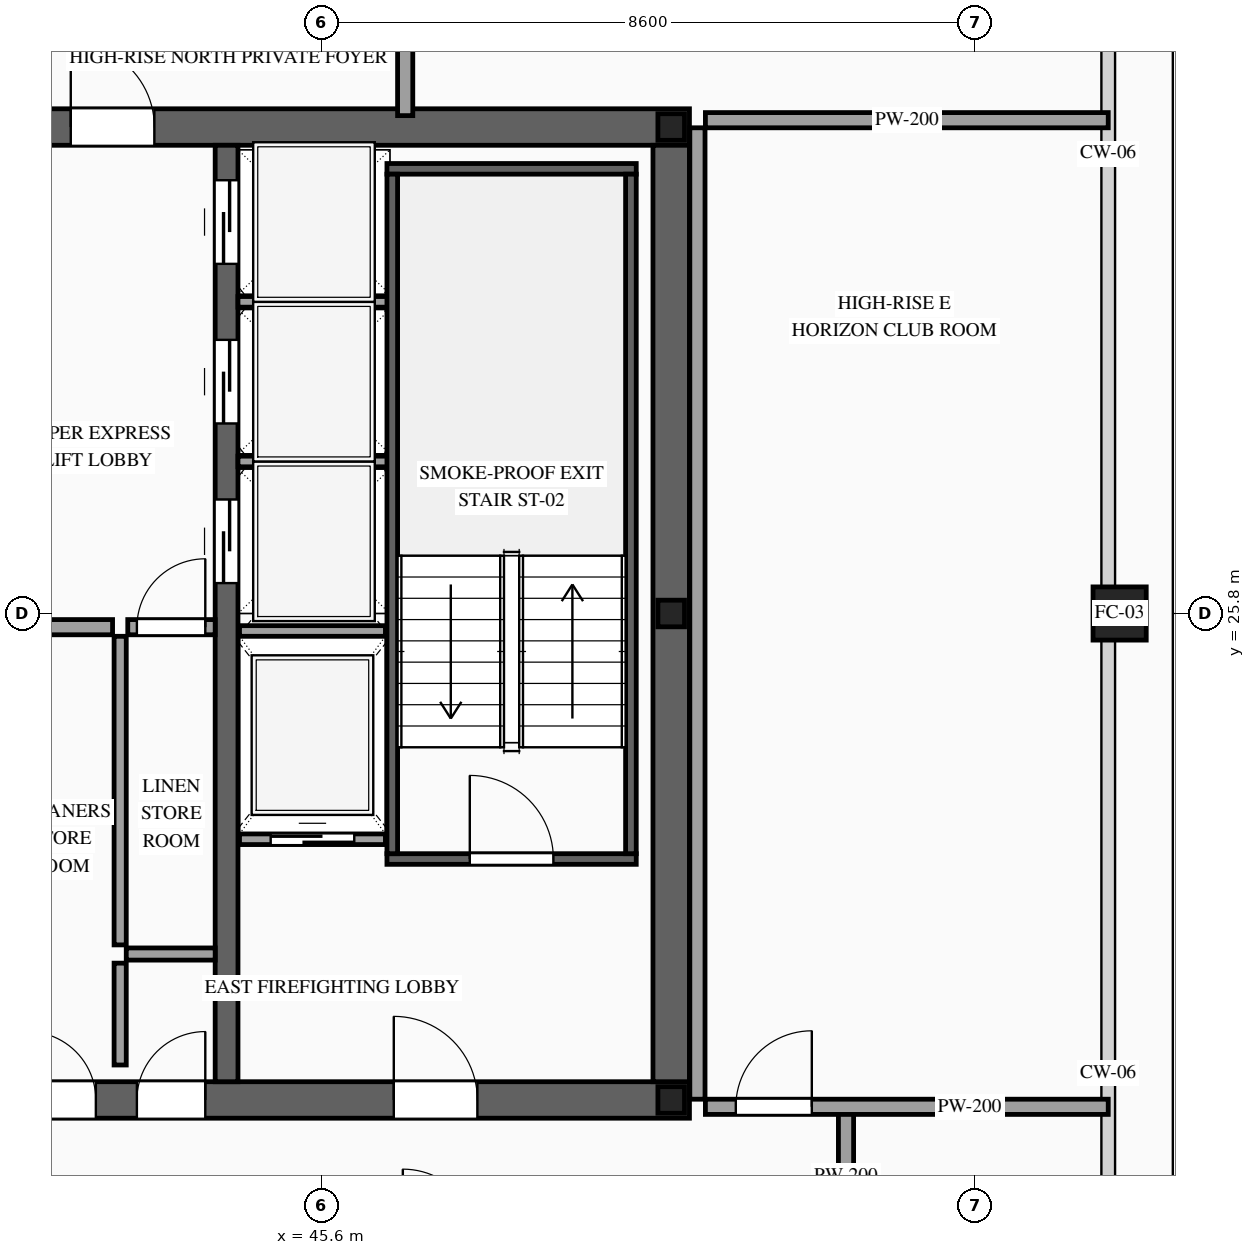
"""IFC4 building model, lengths in metres.
Left out: names, types, materials, properties, quantities, classifications, styles, units other than length and angle.
Written with IfcOpenShell. Run it as: python <this file> out.ifc"""

import sys

from ifc_helpers import new_model, si_unit, direction, frame, frame_2d, origin, origin_2d, place, context, subcontext, project, spatial, rectangle, hollow_rectangle, i_section, extrude, source, transform, mapped, element, fill, save


model = new_model("IFC4")
c1 = context("Model", 3, precision=1e-05, world=origin(), true_north=direction((0.0, 1.0)))
c2 = subcontext(c1, "Body", "Model", "MODEL_VIEW")
j1 = project(units=[si_unit("LENGTHUNIT", "METRE"), si_unit("PLANEANGLEUNIT", "RADIAN")], contexts=[c1])
p1 = place(None, origin())
s1 = spatial("IfcSite", under=j1, at=p1, CompositionType="ELEMENT")
p2 = place(p1, origin())
s2 = spatial("IfcBuilding", under=s1, at=p2, CompositionType="ELEMENT")
p3 = place(p2, frame((0.0, 0.0, 289.1)))
s3 = spatial("IfcBuildingStorey", under=s2, at=p3, CompositionType="ELEMENT", Elevation=289.1)
p4 = place(p3, frame((23.56, 19.4, 0.0), z_axis=(0.0, 0.0, 1.0), x_axis=(1.0, 0.0, 0.0)))
e1 = element("IfcWall", 1, at=p4, inside=s3, PredefinedType="SHEAR", context=c2, shape_type="SweptSolid", body=[
    extrude(rectangle(XDim=26.88, YDim=0.48, at=frame_2d((13.44, 0.0))), origin(), (0.0, 0.0, 1.0), 3.5),
])
p5 = place(p4, frame((1.89, 0.0, 0.0)))
e2 = element("IfcOpeningElement", 2, at=p5, cuts=e1, PredefinedType="OPENING", context=c2, shape_type="SweptSolid", body=[
    extrude(rectangle(XDim=1.1, YDim=2.2, at=frame_2d((0.55, 1.1))), frame((0.0, 0.255, 0.0), z_axis=(0.0, -1.0, 0.0), x_axis=(1.0, 0.0, 0.0)), (0.0, 0.0, 1.0), 0.51),
])
p6 = place(p4, frame((9.79, 0.0, 0.0)))
e3 = element("IfcOpeningElement", 3, at=p6, cuts=e1, PredefinedType="OPENING", context=c2, shape_type="SweptSolid", body=[
    extrude(rectangle(XDim=1.1, YDim=2.2, at=frame_2d((0.55, 1.1))), frame((0.0, 0.255, 0.0), z_axis=(0.0, -1.0, 0.0), x_axis=(1.0, 0.0, 0.0)), (0.0, 0.0, 1.0), 0.51),
])
p7 = place(p4, frame((22.99, 0.0, 0.0)))
e4 = element("IfcOpeningElement", 4, at=p7, cuts=e1, PredefinedType="OPENING", context=c2, shape_type="SweptSolid", body=[
    extrude(rectangle(XDim=1.1, YDim=2.2, at=frame_2d((0.55, 1.1))), frame((0.0, 0.255, 0.0), z_axis=(0.0, -1.0, 0.0), x_axis=(1.0, 0.0, 0.0)), (0.0, 0.0, 1.0), 0.51),
])
p8 = place(p4, frame((19.61, 0.0, 0.0)))
e5 = element("IfcOpeningElement", 5, at=p8, cuts=e1, PredefinedType="OPENING", context=c2, shape_type="SweptSolid", body=[
    extrude(rectangle(XDim=0.9, YDim=2.15, at=frame_2d((0.45, 1.075))), frame((0.0, 0.255, 0.0), z_axis=(0.0, -1.0, 0.0), x_axis=(1.0, 0.0, 0.0)), (0.0, 0.0, 1.0), 0.51),
])
p9 = place(p4, frame((18.17, 0.0, 0.0)))
e6 = element("IfcOpeningElement", 6, at=p9, cuts=e1, PredefinedType="OPENING", context=c2, shape_type="SweptSolid", body=[
    extrude(rectangle(XDim=0.9, YDim=2.15, at=frame_2d((0.45, 1.075))), frame((0.0, 0.255, 0.0), z_axis=(0.0, -1.0, 0.0), x_axis=(1.0, 0.0, 0.0)), (0.0, 0.0, 1.0), 0.51),
])
p10 = place(p3, frame((23.56, 32.2, 0.0), z_axis=(0.0, 0.0, 1.0), x_axis=(1.0, 0.0, 0.0)))
e7 = element("IfcWall", 7, at=p10, inside=s3, PredefinedType="SHEAR", context=c2, shape_type="SweptSolid", body=[
    extrude(rectangle(XDim=26.88, YDim=0.48, at=frame_2d((13.44, 0.0))), origin(), (0.0, 0.0, 1.0), 3.5),
])
p11 = place(p10, frame((4.51, 0.0, 0.0)))
e8 = element("IfcOpeningElement", 8, at=p11, cuts=e7, PredefinedType="OPENING", context=c2, shape_type="SweptSolid", body=[
    extrude(rectangle(XDim=0.9, YDim=2.15, at=frame_2d((0.45, 1.075))), frame((0.0, 0.255, 0.0), z_axis=(0.0, -1.0, 0.0), x_axis=(1.0, 0.0, 0.0)), (0.0, 0.0, 1.0), 0.51),
])
p12 = place(p10, frame((9.79, 0.0, 0.0)))
e9 = element("IfcOpeningElement", 9, at=p12, cuts=e7, PredefinedType="OPENING", context=c2, shape_type="SweptSolid", body=[
    extrude(rectangle(XDim=1.1, YDim=2.2, at=frame_2d((0.55, 1.1))), frame((0.0, 0.255, 0.0), z_axis=(0.0, -1.0, 0.0), x_axis=(1.0, 0.0, 0.0)), (0.0, 0.0, 1.0), 0.51),
])
p13 = place(p10, frame((15.64, 0.0, 0.0)))
e10 = element("IfcOpeningElement", 10, at=p13, cuts=e7, PredefinedType="OPENING", context=c2, shape_type="SweptSolid", body=[
    extrude(rectangle(XDim=1.1, YDim=2.2, at=frame_2d((0.55, 1.1))), frame((0.0, 0.255, 0.0), z_axis=(0.0, -1.0, 0.0), x_axis=(1.0, 0.0, 0.0)), (0.0, 0.0, 1.0), 0.51),
])
p14 = place(p10, frame((18.74, 0.0, 0.0)))
e11 = element("IfcOpeningElement", 11, at=p14, cuts=e7, PredefinedType="OPENING", context=c2, shape_type="SweptSolid", body=[
    extrude(rectangle(XDim=1.1, YDim=2.2, at=frame_2d((0.55, 1.1))), frame((0.0, 0.255, 0.0), z_axis=(0.0, -1.0, 0.0), x_axis=(1.0, 0.0, 0.0)), (0.0, 0.0, 1.0), 0.51),
])
m1 = source(origin(), c2, "Body", "SweptSolid", [
    extrude(rectangle(XDim=12.32, YDim=0.48, at=frame_2d((6.16, 0.0))), origin(), (0.0, 0.0, 1.0), 3.5),
])
p15 = place(p3, frame((50.2, 19.64, 0.0), z_axis=(0.0, 0.0, 1.0), x_axis=(0.0, 1.0, 0.0)))
e12 = element("IfcWall", 12, at=p15, inside=s3, PredefinedType="SHEAR", context=c2, shape_type="MappedRepresentation", body=[
    mapped(m1, transform((0.0, 0.0, 0.0), scale=1.0)),
])
p16 = place(p3, frame((44.35, 19.64, 0.0), z_axis=(0.0, 0.0, 1.0), x_axis=(0.0, 1.0, 0.0)))
e13 = element("IfcWall", 13, at=p16, inside=s3, PredefinedType="SOLIDWALL", context=c2, shape_type="SweptSolid", body=[
    extrude(rectangle(XDim=12.32, YDim=0.3, at=frame_2d((6.16, 0.0))), origin(), (0.0, 0.0, 1.0), 3.5),
])
p17 = place(p16, frame((6.56, 0.0, 0.0)))
e14 = element("IfcOpeningElement", 14, at=p17, cuts=e13, PredefinedType="OPENING", context=c2, shape_type="SweptSolid", body=[
    extrude(rectangle(XDim=1.1, YDim=2.2, at=frame_2d((0.55, 1.1))), frame((0.0, 0.165, 0.0), z_axis=(0.0, -1.0, 0.0), x_axis=(1.0, 0.0, 0.0)), (0.0, 0.0, 1.0), 0.33),
])
p18 = place(p16, frame((8.66, 0.0, 0.0)))
e15 = element("IfcOpeningElement", 15, at=p18, cuts=e13, PredefinedType="OPENING", context=c2, shape_type="SweptSolid", body=[
    extrude(rectangle(XDim=1.1, YDim=2.2, at=frame_2d((0.55, 1.1))), frame((0.0, 0.165, 0.0), z_axis=(0.0, -1.0, 0.0), x_axis=(1.0, 0.0, 0.0)), (0.0, 0.0, 1.0), 0.33),
])
p19 = place(p16, frame((10.76, 0.0, 0.0)))
e16 = element("IfcOpeningElement", 16, at=p19, cuts=e13, PredefinedType="OPENING", context=c2, shape_type="SweptSolid", body=[
    extrude(rectangle(XDim=1.1, YDim=2.2, at=frame_2d((0.55, 1.1))), frame((0.0, 0.165, 0.0), z_axis=(0.0, -1.0, 0.0), x_axis=(1.0, 0.0, 0.0)), (0.0, 0.0, 1.0), 0.33),
])
m2 = source(origin(), c2, "Body", "SweptSolid", [
    extrude(i_section(OverallWidth=0.35, OverallDepth=0.35, WebThickness=0.012, FlangeThickness=0.019, at=origin_2d()), origin(), (0.0, 0.0, 1.0), 3.5),
])
for number, where, z_axis, x_axis in (
    (17, (50.2, 19.4, 0.0), (0.0, 0.0, 1.0), (1.0, 0.0, 0.0)),
    (18, (50.2, 25.8, 0.0), (0.0, 0.0, 1.0), (1.0, 0.0, 0.0)),
    (19, (50.2, 32.2, 0.0), (0.0, 0.0, 1.0), (1.0, 0.0, 0.0)),
):
    element("IfcColumn", number, at=place(p3, frame(where, z_axis=z_axis, x_axis=x_axis)), inside=s3, PredefinedType="COLUMN", context=c2, shape_type="MappedRepresentation", body=[
        mapped(m2, transform((0.0, 0.0, 0.0), scale=1.0)),
    ])
m3 = source(origin(), c2, "Body", "SweptSolid", [
    extrude(hollow_rectangle(XDim=0.7, YDim=0.7, WallThickness=0.032, at=origin_2d()), origin(), (0.0, 0.0, 1.0), 3.5),
])
p20 = place(p3, frame((56.1, 25.8, 0.0), z_axis=(0.0, 0.0, 1.0), x_axis=(1.0, 0.0, 0.0)))
e20 = element("IfcColumn", 20, at=p20, inside=s3, PredefinedType="COLUMN", context=c2, shape_type="MappedRepresentation", body=[
    mapped(m3, transform((0.0, 0.0, 0.0), scale=1.0)),
])
p21 = place(p3, frame((44.52, 22.83, 0.0), z_axis=(0.0, 0.0, 1.0), x_axis=(1.0, 0.0, 0.0)))
e21 = element("IfcWall", 21, at=p21, inside=s3, PredefinedType="SOLIDWALL", context=c2, shape_type="SweptSolid", body=[
    extrude(rectangle(XDim=1.92, YDim=0.14, at=frame_2d((0.96, 0.0))), origin(), (0.0, 0.0, 1.0), 3.28),
])
p22 = place(p21, frame((0.41, 0.0, 0.0)))
e22 = element("IfcOpeningElement", 22, at=p22, cuts=e21, PredefinedType="OPENING", context=c2, shape_type="SweptSolid", body=[
    extrude(rectangle(XDim=1.1, YDim=2.2, at=frame_2d((0.55, 1.1))), frame((0.0, 0.085, 0.0), z_axis=(0.0, -1.0, 0.0), x_axis=(1.0, 0.0, 0.0)), (0.0, 0.0, 1.0), 0.17),
])
m4 = source(origin(), c2, "Body", "SweptSolid", [
    extrude(rectangle(XDim=1.92, YDim=0.14, at=frame_2d((0.96, 0.0))), origin(), (0.0, 0.0, 1.0), 3.28),
])
p23 = place(p3, frame((44.52, 25.57, 0.0), z_axis=(0.0, 0.0, 1.0), x_axis=(1.0, 0.0, 0.0)))
e23 = element("IfcWall", 23, at=p23, inside=s3, PredefinedType="SOLIDWALL", context=c2, shape_type="MappedRepresentation", body=[
    mapped(m4, transform((0.0, 0.0, 0.0), scale=1.0)),
])
m5 = source(origin(), c2, "Body", "SweptSolid", [
    extrude(rectangle(XDim=2.0, YDim=0.14, at=frame_2d((1.0, 0.0))), origin(), (0.0, 0.0, 1.0), 3.28),
])
for number, where, z_axis, x_axis in (
    (24, (44.5, 27.8, 0.0), (0.0, 0.0, 1.0), (1.0, 0.0, 0.0)),
    (25, (44.5, 29.9, 0.0), (0.0, 0.0, 1.0), (1.0, 0.0, 0.0)),
):
    element("IfcWall", number, at=place(p3, frame(where, z_axis=z_axis, x_axis=x_axis)), inside=s3, PredefinedType="SOLIDWALL", context=c2, shape_type="MappedRepresentation", body=[
        mapped(m5, transform((0.0, 0.0, 0.0), scale=1.0)),
    ])
p24 = place(p3, frame((46.46, 22.57, 0.0), z_axis=(0.0, 0.0, 1.0), x_axis=(1.0, 0.0, 0.0)))
e26 = element("IfcWall", 26, at=p24, inside=s3, PredefinedType="SOLIDWALL", context=c2, shape_type="SweptSolid", body=[
    extrude(rectangle(XDim=3.28, YDim=0.14, at=frame_2d((1.64, 0.0))), origin(), (0.0, 0.0, 1.0), 3.28),
])
p25 = place(p24, frame((1.09, 0.0, 0.0)))
e27 = element("IfcOpeningElement", 27, at=p25, cuts=e26, PredefinedType="OPENING", context=c2, shape_type="SweptSolid", body=[
    extrude(rectangle(XDim=1.1, YDim=2.2, at=frame_2d((0.55, 1.1))), frame((0.0, 0.085, 0.0), z_axis=(0.0, -1.0, 0.0), x_axis=(1.0, 0.0, 0.0)), (0.0, 0.0, 1.0), 0.17),
])
m6 = source(origin(), c2, "Body", "SweptSolid", [
    extrude(rectangle(XDim=3.28, YDim=0.14, at=frame_2d((1.64, 0.0))), origin(), (0.0, 0.0, 1.0), 3.28),
])
p26 = place(p3, frame((46.46, 31.65, 0.0), z_axis=(0.0, 0.0, 1.0), x_axis=(1.0, 0.0, 0.0)))
e28 = element("IfcWall", 28, at=p26, inside=s3, PredefinedType="SOLIDWALL", context=c2, shape_type="MappedRepresentation", body=[
    mapped(m6, transform((0.0, 0.0, 0.0), scale=1.0)),
])
m7 = source(origin(), c2, "Body", "SweptSolid", [
    extrude(rectangle(XDim=8.94, YDim=0.14, at=frame_2d((4.47, 0.0))), origin(), (0.0, 0.0, 1.0), 3.28),
])
for number, where, z_axis, x_axis in (
    (29, (46.53, 22.64, 0.0), (0.0, 0.0, 1.0), (0.0, 1.0, 0.0)),
    (30, (49.67, 22.64, 0.0), (0.0, 0.0, 1.0), (0.0, 1.0, 0.0)),
):
    element("IfcWall", number, at=place(p3, frame(where, z_axis=z_axis, x_axis=x_axis)), inside=s3, PredefinedType="SOLIDWALL", context=c2, shape_type="MappedRepresentation", body=[
        mapped(m7, transform((0.0, 0.0, 0.0), scale=1.0)),
    ])
m8 = source(origin(), c2, "Body", "SweptSolid", [
    extrude(rectangle(XDim=1.34, YDim=0.16, at=frame_2d((0.67, 0.0))), origin(), (0.0, 0.0, 1.0), 3.28),
])
p27 = place(p3, frame((42.95, 19.86, 0.0), z_axis=(0.0, 0.0, 1.0), x_axis=(0.0, 1.0, 0.0)))
e31 = element("IfcWall", 31, at=p27, inside=s3, PredefinedType="PARTITIONING", context=c2, shape_type="MappedRepresentation", body=[
    mapped(m8, transform((0.0, 0.0, 0.0), scale=1.0)),
])
m9 = source(origin(), c2, "Body", "SweptSolid", [
    extrude(rectangle(XDim=1.17, YDim=0.16, at=frame_2d((0.585, 0.0))), origin(), (0.0, 0.0, 1.0), 3.28),
])
p28 = place(p3, frame((43.03, 21.32, 0.0), z_axis=(0.0, 0.0, 1.0), x_axis=(1.0, 0.0, 0.0)))
e32 = element("IfcWall", 32, at=p28, inside=s3, PredefinedType="PARTITIONING", context=c2, shape_type="MappedRepresentation", body=[
    mapped(m9, transform((0.0, 0.0, 0.0), scale=1.0)),
])
m10 = source(origin(), c2, "Body", "SweptSolid", [
    extrude(rectangle(XDim=1.35, YDim=0.2, at=frame_2d((0.675, 0.0))), origin(), (0.0, 0.0, 1.0), 3.28),
])
p29 = place(p3, frame((41.5, 25.62, 0.0), z_axis=(0.0, 0.0, 1.0), x_axis=(1.0, 0.0, 0.0)))
e33 = element("IfcWall", 33, at=p29, inside=s3, PredefinedType="PARTITIONING", context=c2, shape_type="MappedRepresentation", body=[
    mapped(m10, transform((0.0, 0.0, 0.0), scale=1.0)),
])
m11 = source(origin(), c2, "Body", "SweptSolid", [
    extrude(rectangle(XDim=4.06, YDim=0.16, at=frame_2d((2.03, 0.0))), origin(), (0.0, 0.0, 1.0), 3.28),
])
p30 = place(p3, frame((42.95, 21.44, 0.0), z_axis=(0.0, 0.0, 1.0), x_axis=(0.0, 1.0, 0.0)))
e34 = element("IfcWall", 34, at=p30, inside=s3, PredefinedType="PARTITIONING", context=c2, shape_type="MappedRepresentation", body=[
    mapped(m11, transform((0.0, 0.0, 0.0), scale=1.0)),
])
p31 = place(p3, frame((43.05, 25.62, 0.0), z_axis=(0.0, 0.0, 1.0), x_axis=(1.0, 0.0, 0.0)))
e35 = element("IfcWall", 35, at=p31, inside=s3, PredefinedType="PARTITIONING", context=c2, shape_type="SweptSolid", body=[
    extrude(rectangle(XDim=1.15, YDim=0.2, at=frame_2d((0.575, 0.0))), origin(), (0.0, 0.0, 1.0), 3.28),
])
p32 = place(p31, frame((0.12, 0.0, 0.0)))
e36 = element("IfcOpeningElement", 36, at=p32, cuts=e35, PredefinedType="OPENING", context=c2, shape_type="SweptSolid", body=[
    extrude(rectangle(XDim=0.9, YDim=2.15, at=frame_2d((0.45, 1.075))), frame((0.0, 0.115, 0.0), z_axis=(0.0, -1.0, 0.0), x_axis=(1.0, 0.0, 0.0)), (0.0, 0.0, 1.0), 0.23),
])
m12 = source(origin(), c2, "Body", "SweptSolid", [
    extrude(rectangle(XDim=1.7, YDim=0.2, at=frame_2d((0.85, 0.0))), origin(), (0.0, 0.0, 1.0), 3.28),
])
for number, where, z_axis, x_axis in (
    (37, (46.7, 32.35, 0.0), (0.0, 0.0, 1.0), (0.0, 1.0, 0.0)),
    (38, (52.5, 17.55, 0.0), (0.0, 0.0, 1.0), (0.0, 1.0, 0.0)),
):
    element("IfcWall", number, at=place(p3, frame(where, z_axis=z_axis, x_axis=x_axis)), inside=s3, PredefinedType="PARTITIONING", context=c2, shape_type="MappedRepresentation", body=[
        mapped(m12, transform((0.0, 0.0, 0.0), scale=1.0)),
    ])
p33 = place(p3, frame((50.65, 19.31, 0.0), z_axis=(0.0, 0.0, 1.0), x_axis=(1.0, 0.0, 0.0)))
e39 = element("IfcWall", 39, at=p33, inside=s3, PredefinedType="PARTITIONING", context=c2, shape_type="SweptSolid", body=[
    extrude(rectangle(XDim=5.3, YDim=0.2, at=frame_2d((2.65, 0.0))), origin(), (0.0, 0.0, 1.0), 2.825),
])
p34 = place(p33, frame((0.4, 0.0, 0.0)))
e40 = element("IfcOpeningElement", 40, at=p34, cuts=e39, PredefinedType="OPENING", context=c2, shape_type="SweptSolid", body=[
    extrude(rectangle(XDim=1.0, YDim=2.2, at=frame_2d((0.5, 1.1))), frame((0.0, 0.115, 0.0), z_axis=(0.0, -1.0, 0.0), x_axis=(1.0, 0.0, 0.0)), (0.0, 0.0, 1.0), 0.23),
])
m13 = source(origin(), c2, "Body", "SweptSolid", [
    extrude(rectangle(XDim=5.3, YDim=0.2, at=frame_2d((2.65, 0.0))), origin(), (0.0, 0.0, 1.0), 2.825),
])
p35 = place(p3, frame((50.65, 32.29, 0.0), z_axis=(0.0, 0.0, 1.0), x_axis=(1.0, 0.0, 0.0)))
e41 = element("IfcWall", 41, at=p35, inside=s3, PredefinedType="PARTITIONING", context=c2, shape_type="MappedRepresentation", body=[
    mapped(m13, transform((0.0, 0.0, 0.0), scale=1.0)),
])
m14 = source(origin(), c2, "Body", "SweptSolid", [
    extrude(rectangle(XDim=12.78, YDim=0.2, at=frame_2d((6.39, 0.0))), origin(), (0.0, 0.0, 1.0), 3.28),
])
p36 = place(p3, frame((50.545, 19.41, 0.0), z_axis=(0.0, 0.0, 1.0), x_axis=(0.0, 1.0, 0.0)))
e42 = element("IfcWall", 42, at=p36, inside=s3, PredefinedType="PARTITIONING", context=c2, shape_type="MappedRepresentation", body=[
    mapped(m14, transform((0.0, 0.0, 0.0), scale=1.0)),
])
m15 = source(origin(), c2, "Body", "SweptSolid", [
    extrude(rectangle(XDim=1.1, YDim=2.2, at=frame_2d((0.55, 1.1))), frame((0.0, 0.025, 0.0), z_axis=(0.0, -1.0, 0.0), x_axis=(1.0, 0.0, 0.0)), (0.0, 0.0, 1.0), 0.05),
])
p37 = place(p22, origin())
e43 = element("IfcDoor", 43, at=p37, inside=s3, OperationType="SLIDING_TO_RIGHT", PredefinedType="DOOR", context=c2, shape_type="MappedRepresentation", body=[
    mapped(m15, transform((0.0, 0.0, 0.0), scale=1.0)),
])
fill(e22, e43)
p38 = place(p17, origin())
e44 = element("IfcDoor", 44, at=p38, inside=s3, OperationType="SLIDING_TO_LEFT", PredefinedType="DOOR", context=c2, shape_type="MappedRepresentation", body=[
    mapped(m15, transform((0.0, 0.0, 0.0), scale=1.0)),
])
fill(e14, e44)
p39 = place(p18, origin())
e45 = element("IfcDoor", 45, at=p39, inside=s3, OperationType="SLIDING_TO_RIGHT", PredefinedType="DOOR", context=c2, shape_type="MappedRepresentation", body=[
    mapped(m15, transform((0.0, 0.0, 0.0), scale=1.0)),
])
fill(e15, e45)
p40 = place(p19, origin())
e46 = element("IfcDoor", 46, at=p40, inside=s3, OperationType="SLIDING_TO_LEFT", PredefinedType="DOOR", context=c2, shape_type="MappedRepresentation", body=[
    mapped(m15, transform((0.0, 0.0, 0.0), scale=1.0)),
])
fill(e16, e46)
m16 = source(origin(), c2, "Body", "SweptSolid", [
    extrude(rectangle(XDim=1.1, YDim=2.2, at=frame_2d((0.55, 1.1))), frame((0.0, 0.025, 0.0), z_axis=(0.0, -1.0, 0.0), x_axis=(1.0, 0.0, 0.0)), (0.0, 0.0, 1.0), 0.05),
])
p41 = place(p25, origin())
e47 = element("IfcDoor", 47, at=p41, inside=s3, OperationType="SINGLE_SWING_LEFT", PredefinedType="DOOR", context=c2, shape_type="MappedRepresentation", body=[
    mapped(m16, transform((0.0, 0.0, 0.0), scale=1.0)),
])
fill(e27, e47)
p42 = place(p7, origin())
e48 = element("IfcDoor", 48, at=p42, inside=s3, OperationType="SINGLE_SWING_LEFT", PredefinedType="DOOR", context=c2, shape_type="MappedRepresentation", body=[
    mapped(m16, transform((0.0, 0.0, 0.0), scale=1.0)),
])
fill(e4, e48)
p43 = place(p14, origin())
e49 = element("IfcDoor", 49, at=p43, inside=s3, OperationType="SINGLE_SWING_LEFT", PredefinedType="DOOR", context=c2, shape_type="MappedRepresentation", body=[
    mapped(m16, transform((0.0, 0.0, 0.0), scale=1.0)),
])
fill(e11, e49)
m17 = source(origin(), c2, "Body", "SweptSolid", [
    extrude(rectangle(XDim=0.9, YDim=2.15, at=frame_2d((0.45, 1.075))), frame((0.0, 0.025, 0.0), z_axis=(0.0, -1.0, 0.0), x_axis=(1.0, 0.0, 0.0)), (0.0, 0.0, 1.0), 0.05),
])
p44 = place(p8, origin())
e50 = element("IfcDoor", 50, at=p44, inside=s3, OperationType="SINGLE_SWING_RIGHT", PredefinedType="DOOR", context=c2, shape_type="MappedRepresentation", body=[
    mapped(m17, transform((0.0, 0.0, 0.0), scale=1.0)),
])
fill(e5, e50)
p45 = place(p9, origin())
e51 = element("IfcDoor", 51, at=p45, inside=s3, OperationType="SINGLE_SWING_LEFT", PredefinedType="DOOR", context=c2, shape_type="MappedRepresentation", body=[
    mapped(m17, transform((0.0, 0.0, 0.0), scale=1.0)),
])
fill(e6, e51)
p46 = place(p32, origin())
e52 = element("IfcDoor", 52, at=p46, inside=s3, OperationType="SINGLE_SWING_RIGHT", PredefinedType="DOOR", context=c2, shape_type="MappedRepresentation", body=[
    mapped(m17, transform((0.0, 0.0, 0.0), scale=1.0)),
])
fill(e36, e52)
m18 = source(origin(), c2, "Body", "SweptSolid", [
    extrude(rectangle(XDim=1.0, YDim=2.2, at=frame_2d((0.5, 1.1))), frame((0.0, 0.025, 0.0), z_axis=(0.0, -1.0, 0.0), x_axis=(1.0, 0.0, 0.0)), (0.0, 0.0, 1.0), 0.05),
])
p47 = place(p34, origin())
e53 = element("IfcDoor", 53, at=p47, inside=s3, OperationType="SINGLE_SWING_RIGHT", PredefinedType="DOOR", context=c2, shape_type="MappedRepresentation", body=[
    mapped(m18, transform((0.0, 0.0, 0.0), scale=1.0)),
])
fill(e40, e53)
save(model, sys.argv[1])
